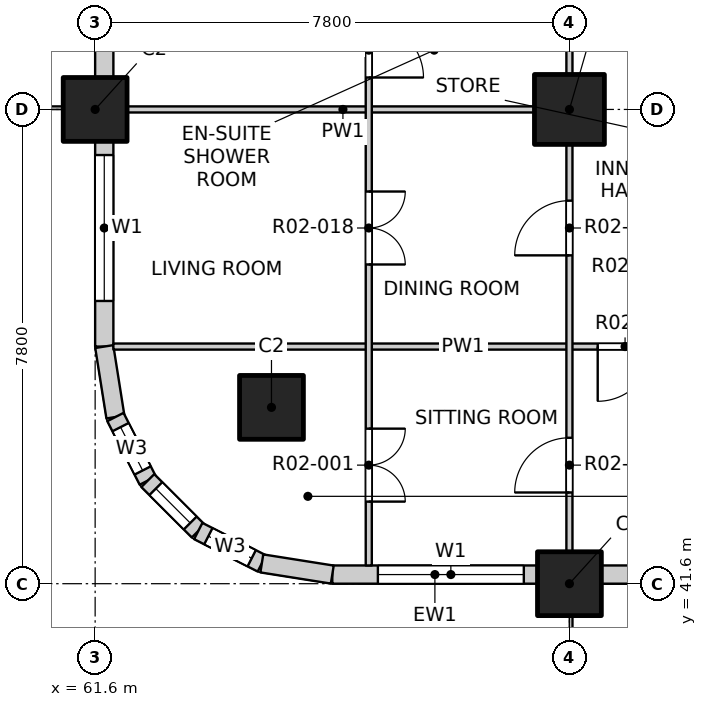
"""IFC4 building model, lengths in metres.
Left out: names, types, materials, properties, quantities, classifications, styles, units other than length and angle.
Written with IfcOpenShell. Run it as: python <this file> out.ifc"""

import sys

from ifc_helpers import new_model, si_unit, direction, frame, frame_2d, origin, origin_2d, place, context, subcontext, project, spatial, rectangle, extrude, element, fill, save


model = new_model("IFC4")
c1 = context("Model", 3, precision=1e-05, world=origin(), true_north=direction((0.0, 1.0)))
c2 = subcontext(c1, "Body", "Model", "MODEL_VIEW")
j1 = project(units=[si_unit("LENGTHUNIT", "METRE"), si_unit("PLANEANGLEUNIT", "RADIAN")], contexts=[c1])
p1 = place(None, origin())
s1 = spatial("IfcSite", under=j1, at=p1, CompositionType="ELEMENT")
p2 = place(p1, origin())
s2 = spatial("IfcBuilding", under=s1, at=p2, CompositionType="ELEMENT")
p3 = place(p2, frame((0.0, 0.0, 36.5)))
s3 = spatial("IfcBuildingStorey", under=s2, at=p3, CompositionType="ELEMENT", Elevation=36.5)
for number, where, z_axis, x_axis in (
    (1, (64.5, 44.5, -0.25), (0.0, 0.0, 1.0), (1.0, 0.0, 0.0)),
    (2, (61.6, 49.4, -0.25), (0.0, 0.0, 1.0), (1.0, 0.0, 0.0)),
    (3, (69.4, 41.6, -0.25), (0.0, 0.0, 1.0), (1.0, 0.0, 0.0)),
):
    element("IfcColumn", number, at=place(p3, frame(where, z_axis=z_axis, x_axis=x_axis)), inside=s3, PredefinedType="COLUMN", context=c2, shape_type="SweptSolid", body=[
        extrude(rectangle(XDim=1.05, YDim=1.05, at=origin_2d()), origin(), (0.0, 0.0, 1.0), 3.4),
    ])
p4 = place(p3, frame((69.4, 49.4, -0.25), z_axis=(0.0, 0.0, 1.0), x_axis=(1.0, 0.0, 0.0)))
e4 = element("IfcColumn", 4, at=p4, inside=s3, PredefinedType="COLUMN", context=c2, shape_type="SweptSolid", body=[
    extrude(rectangle(XDim=1.15, YDim=1.15, at=origin_2d()), origin(), (0.0, 0.0, 1.0), 3.4),
])
p5 = place(p3, frame((65.5, 41.75, 0.0), z_axis=(0.0, 0.0, 1.0), x_axis=(1.0, 0.0, 0.0)))
e5 = element("IfcWall", 5, at=p5, inside=s3, PredefinedType="SOLIDWALL", context=c2, shape_type="SweptSolid", body=[
    extrude(rectangle(XDim=3.375, YDim=0.3, at=frame_2d((1.688, 0.0))), origin(), (0.0, 0.0, 1.0), 2.7),
])
p6 = place(p5, frame((0.75, 0.0, 0.9)))
e6 = element("IfcOpeningElement", 6, at=p6, cuts=e5, PredefinedType="OPENING", context=c2, shape_type="SweptSolid", body=[
    extrude(rectangle(XDim=2.4, YDim=1.8, at=frame_2d((1.2, 0.9))), frame((0.0, 0.16, 0.0), z_axis=(0.0, -1.0, 0.0), x_axis=(1.0, 0.0, 0.0)), (0.0, 0.0, 1.0), 0.32),
])
p7 = place(p3, frame((69.925, 41.75, 0.0), z_axis=(0.0, 0.0, 1.0), x_axis=(1.0, 0.0, 0.0)))
e7 = element("IfcWall", 7, at=p7, inside=s3, PredefinedType="SOLIDWALL", context=c2, shape_type="SweptSolid", body=[
    extrude(rectangle(XDim=6.75, YDim=0.3, at=frame_2d((3.375, 0.0))), origin(), (0.0, 0.0, 1.0), 2.7),
])
p8 = place(p7, frame((0.525, 0.0, 0.0)))
e8 = element("IfcOpeningElement", 8, at=p8, cuts=e7, PredefinedType="OPENING", context=c2, shape_type="SweptSolid", body=[
    extrude(rectangle(XDim=1.8, YDim=2.4, at=frame_2d((0.9, 1.2))), frame((0.0, 0.16, 0.0), z_axis=(0.0, -1.0, 0.0), x_axis=(1.0, 0.0, 0.0)), (0.0, 0.0, 1.0), 0.32),
])
p9 = place(p7, frame((4.125, 0.0, 0.9)))
e9 = element("IfcOpeningElement", 9, at=p9, cuts=e7, PredefinedType="OPENING", context=c2, shape_type="SweptSolid", body=[
    extrude(rectangle(XDim=2.4, YDim=1.8, at=frame_2d((1.2, 0.9))), frame((0.0, 0.16, 0.0), z_axis=(0.0, -1.0, 0.0), x_axis=(1.0, 0.0, 0.0)), (0.0, 0.0, 1.0), 0.32),
])
p10 = place(p3, frame((61.75, 45.5, 0.0), z_axis=(0.0, 0.0, 1.0), x_axis=(0.0, 1.0, 0.0)))
e10 = element("IfcWall", 10, at=p10, inside=s3, PredefinedType="SOLIDWALL", context=c2, shape_type="SweptSolid", body=[
    extrude(rectangle(XDim=3.375, YDim=0.3, at=frame_2d((1.688, 0.0))), origin(), (0.0, 0.0, 1.0), 2.7),
])
p11 = place(p10, frame((0.75, 0.0, 0.9)))
e11 = element("IfcOpeningElement", 11, at=p11, cuts=e10, PredefinedType="OPENING", context=c2, shape_type="SweptSolid", body=[
    extrude(rectangle(XDim=2.4, YDim=1.8, at=frame_2d((1.2, 0.9))), frame((0.0, 0.16, 0.0), z_axis=(0.0, -1.0, 0.0), x_axis=(1.0, 0.0, 0.0)), (0.0, 0.0, 1.0), 0.32),
])
p12 = place(p3, frame((61.75, 49.925, 0.0), z_axis=(0.0, 0.0, 1.0), x_axis=(0.0, 1.0, 0.0)))
e12 = element("IfcWall", 12, at=p12, inside=s3, PredefinedType="SOLIDWALL", context=c2, shape_type="SweptSolid", body=[
    extrude(rectangle(XDim=6.75, YDim=0.3, at=frame_2d((3.375, 0.0))), origin(), (0.0, 0.0, 1.0), 2.7),
])
p13 = place(p12, frame((0.525, 0.0, 0.0)))
e13 = element("IfcOpeningElement", 13, at=p13, cuts=e12, PredefinedType="OPENING", context=c2, shape_type="SweptSolid", body=[
    extrude(rectangle(XDim=1.8, YDim=2.4, at=frame_2d((0.9, 1.2))), frame((0.0, 0.16, 0.0), z_axis=(0.0, -1.0, 0.0), x_axis=(1.0, 0.0, 0.0)), (0.0, 0.0, 1.0), 0.32),
])
p14 = place(p12, frame((4.125, 0.0, 0.9)))
e14 = element("IfcOpeningElement", 14, at=p14, cuts=e12, PredefinedType="OPENING", context=c2, shape_type="SweptSolid", body=[
    extrude(rectangle(XDim=2.4, YDim=1.8, at=frame_2d((1.2, 0.9))), frame((0.0, 0.16, 0.0), z_axis=(0.0, -1.0, 0.0), x_axis=(1.0, 0.0, 0.0)), (0.0, 0.0, 1.0), 0.32),
])
p15 = place(p3, frame((61.75, 45.5, 0.0), z_axis=(0.0, 0.0, 1.0), x_axis=(0.156496880861, -0.987678452879, 0.0)))
e15 = element("IfcWall", 15, at=p15, inside=s3, PredefinedType="SOLIDWALL", context=c2, shape_type="SweptSolid", body=[
    extrude(rectangle(XDim=1.173, YDim=0.3, at=frame_2d((0.586, 0.0))), origin(), (0.0, 0.0, 1.0), 2.7),
])
p16 = place(p3, frame((61.934, 44.341, 0.0), z_axis=(0.0, 0.0, 1.0), x_axis=(0.454025524128, -0.890988677504, 0.0)))
e16 = element("IfcWall", 16, at=p16, inside=s3, PredefinedType="SOLIDWALL", context=c2, shape_type="SweptSolid", body=[
    extrude(rectangle(XDim=1.173, YDim=0.3, at=frame_2d((0.587, 0.0))), origin(), (0.0, 0.0, 1.0), 2.7),
])
p17 = place(p16, frame((0.187, 0.0, 0.9)))
e17 = element("IfcOpeningElement", 17, at=p17, cuts=e16, PredefinedType="OPENING", context=c2, shape_type="SweptSolid", body=[
    extrude(rectangle(XDim=0.8, YDim=1.2, at=frame_2d((0.4, 0.6))), frame((0.0, 0.16, 0.0), z_axis=(0.0, -1.0, 0.0), x_axis=(1.0, 0.0, 0.0)), (0.0, 0.0, 1.0), 0.32),
])
p18 = place(p3, frame((62.466, 43.296, 0.0), z_axis=(0.0, 0.0, 1.0), x_axis=(0.707106781187, -0.707106781187, 0.0)))
e18 = element("IfcWall", 18, at=p18, inside=s3, PredefinedType="SOLIDWALL", context=c2, shape_type="SweptSolid", body=[
    extrude(rectangle(XDim=1.173, YDim=0.3, at=frame_2d((0.586, 0.0))), origin(), (0.0, 0.0, 1.0), 2.7),
])
p19 = place(p18, frame((0.187, 0.0, 0.9)))
e19 = element("IfcOpeningElement", 19, at=p19, cuts=e18, PredefinedType="OPENING", context=c2, shape_type="SweptSolid", body=[
    extrude(rectangle(XDim=0.8, YDim=1.2, at=frame_2d((0.4, 0.6))), frame((0.0, 0.16, 0.0), z_axis=(0.0, -1.0, 0.0), x_axis=(1.0, 0.0, 0.0)), (0.0, 0.0, 1.0), 0.32),
])
p20 = place(p3, frame((63.296, 42.466, 0.0), z_axis=(0.0, 0.0, 1.0), x_axis=(0.890988677504, -0.454025524128, 0.0)))
e20 = element("IfcWall", 20, at=p20, inside=s3, PredefinedType="SOLIDWALL", context=c2, shape_type="SweptSolid", body=[
    extrude(rectangle(XDim=1.173, YDim=0.3, at=frame_2d((0.587, 0.0))), origin(), (0.0, 0.0, 1.0), 2.7),
])
p21 = place(p20, frame((0.187, 0.0, 0.9)))
e21 = element("IfcOpeningElement", 21, at=p21, cuts=e20, PredefinedType="OPENING", context=c2, shape_type="SweptSolid", body=[
    extrude(rectangle(XDim=0.8, YDim=1.2, at=frame_2d((0.4, 0.6))), frame((0.0, 0.16, 0.0), z_axis=(0.0, -1.0, 0.0), x_axis=(1.0, 0.0, 0.0)), (0.0, 0.0, 1.0), 0.32),
])
p22 = place(p3, frame((64.341, 41.934, 0.0), z_axis=(0.0, 0.0, 1.0), x_axis=(0.987678452879, -0.156496880861, 0.0)))
e22 = element("IfcWall", 22, at=p22, inside=s3, PredefinedType="SOLIDWALL", context=c2, shape_type="SweptSolid", body=[
    extrude(rectangle(XDim=1.173, YDim=0.3, at=frame_2d((0.586, 0.0))), origin(), (0.0, 0.0, 1.0), 2.7),
])
p23 = place(p3, frame((61.9, 45.5, 0.0), z_axis=(0.0, 0.0, 1.0), x_axis=(1.0, 0.0, 0.0)))
e23 = element("IfcWall", 23, at=p23, inside=s3, PredefinedType="PARTITIONING", context=c2, shape_type="SweptSolid", body=[
    extrude(rectangle(XDim=11.5, YDim=0.1, at=frame_2d((5.75, 0.0))), origin(), (0.0, 0.0, 1.0), 3.15),
])
p24 = place(p23, frame((7.965, 0.0, 0.0)))
e24 = element("IfcOpeningElement", 24, at=p24, cuts=e23, PredefinedType="OPENING", context=c2, shape_type="SweptSolid", body=[
    extrude(rectangle(XDim=0.9, YDim=2.1, at=frame_2d((0.45, 1.05))), frame((0.0, 0.06, 0.0), z_axis=(0.0, -1.0, 0.0), x_axis=(1.0, 0.0, 0.0)), (0.0, 0.0, 1.0), 0.12),
])
p25 = place(p3, frame((61.9, 49.4, 0.0), z_axis=(0.0, 0.0, 1.0), x_axis=(1.0, 0.0, 0.0)))
e25 = element("IfcWall", 25, at=p25, inside=s3, PredefinedType="PARTITIONING", context=c2, shape_type="SweptSolid", body=[
    extrude(rectangle(XDim=7.55, YDim=0.1, at=frame_2d((3.775, 0.0))), origin(), (0.0, 0.0, 1.0), 3.15),
])
p26 = place(p3, frame((66.1, 41.9, 0.0), z_axis=(0.0, 0.0, 1.0), x_axis=(0.0, 1.0, 0.0)))
e26 = element("IfcWall", 26, at=p26, inside=s3, PredefinedType="PARTITIONING", context=c2, shape_type="SweptSolid", body=[
    extrude(rectangle(XDim=34.7, YDim=0.1, at=frame_2d((17.35, 0.0))), origin(), (0.0, 0.0, 1.0), 3.15),
])
p27 = place(p26, frame((1.05, 0.0, 0.0)))
e27 = element("IfcOpeningElement", 27, at=p27, cuts=e26, PredefinedType="OPENING", context=c2, shape_type="SweptSolid", body=[
    extrude(rectangle(XDim=1.2, YDim=2.1, at=frame_2d((0.6, 1.05))), frame((0.0, 0.06, 0.0), z_axis=(0.0, -1.0, 0.0), x_axis=(1.0, 0.0, 0.0)), (0.0, 0.0, 1.0), 0.12),
])
p28 = place(p26, frame((4.95, 0.0, 0.0)))
e28 = element("IfcOpeningElement", 28, at=p28, cuts=e26, PredefinedType="OPENING", context=c2, shape_type="SweptSolid", body=[
    extrude(rectangle(XDim=1.2, YDim=2.1, at=frame_2d((0.6, 1.05))), frame((0.0, 0.06, 0.0), z_axis=(0.0, -1.0, 0.0), x_axis=(1.0, 0.0, 0.0)), (0.0, 0.0, 1.0), 0.12),
])
p29 = place(p26, frame((8.025, 0.0, 0.0)))
e29 = element("IfcOpeningElement", 29, at=p29, cuts=e26, PredefinedType="OPENING", context=c2, shape_type="SweptSolid", body=[
    extrude(rectangle(XDim=0.9, YDim=2.1, at=frame_2d((0.45, 1.05))), frame((0.0, 0.06, 0.0), z_axis=(0.0, -1.0, 0.0), x_axis=(1.0, 0.0, 0.0)), (0.0, 0.0, 1.0), 0.12),
])
p30 = place(p26, frame((9.975, 0.0, 0.0)))
e30 = element("IfcOpeningElement", 30, at=p30, cuts=e26, PredefinedType="OPENING", context=c2, shape_type="SweptSolid", body=[
    extrude(rectangle(XDim=0.9, YDim=2.1, at=frame_2d((0.45, 1.05))), frame((0.0, 0.06, 0.0), z_axis=(0.0, -1.0, 0.0), x_axis=(1.0, 0.0, 0.0)), (0.0, 0.0, 1.0), 0.12),
])
p31 = place(p26, frame((12.75, 0.0, 0.0)))
e31 = element("IfcOpeningElement", 31, at=p31, cuts=e26, PredefinedType="OPENING", context=c2, shape_type="SweptSolid", body=[
    extrude(rectangle(XDim=1.2, YDim=2.1, at=frame_2d((0.6, 1.05))), frame((0.0, 0.06, 0.0), z_axis=(0.0, -1.0, 0.0), x_axis=(1.0, 0.0, 0.0)), (0.0, 0.0, 1.0), 0.12),
])
p32 = place(p26, frame((15.825, 0.0, 0.0)))
e32 = element("IfcOpeningElement", 32, at=p32, cuts=e26, PredefinedType="OPENING", context=c2, shape_type="SweptSolid", body=[
    extrude(rectangle(XDim=0.9, YDim=2.1, at=frame_2d((0.45, 1.05))), frame((0.0, 0.06, 0.0), z_axis=(0.0, -1.0, 0.0), x_axis=(1.0, 0.0, 0.0)), (0.0, 0.0, 1.0), 0.12),
])
p33 = place(p26, frame((17.775, 0.0, 0.0)))
e33 = element("IfcOpeningElement", 33, at=p33, cuts=e26, PredefinedType="OPENING", context=c2, shape_type="SweptSolid", body=[
    extrude(rectangle(XDim=0.9, YDim=2.1, at=frame_2d((0.45, 1.05))), frame((0.0, 0.06, 0.0), z_axis=(0.0, -1.0, 0.0), x_axis=(1.0, 0.0, 0.0)), (0.0, 0.0, 1.0), 0.12),
])
p34 = place(p26, frame((19.725, 0.0, 0.0)))
e34 = element("IfcOpeningElement", 34, at=p34, cuts=e26, PredefinedType="OPENING", context=c2, shape_type="SweptSolid", body=[
    extrude(rectangle(XDim=0.9, YDim=2.1, at=frame_2d((0.45, 1.05))), frame((0.0, 0.06, 0.0), z_axis=(0.0, -1.0, 0.0), x_axis=(1.0, 0.0, 0.0)), (0.0, 0.0, 1.0), 0.12),
])
p35 = place(p26, frame((21.675, 0.0, 0.0)))
e35 = element("IfcOpeningElement", 35, at=p35, cuts=e26, PredefinedType="OPENING", context=c2, shape_type="SweptSolid", body=[
    extrude(rectangle(XDim=0.9, YDim=2.1, at=frame_2d((0.45, 1.05))), frame((0.0, 0.06, 0.0), z_axis=(0.0, -1.0, 0.0), x_axis=(1.0, 0.0, 0.0)), (0.0, 0.0, 1.0), 0.12),
])
p36 = place(p26, frame((24.45, 0.0, 0.0)))
e36 = element("IfcOpeningElement", 36, at=p36, cuts=e26, PredefinedType="OPENING", context=c2, shape_type="SweptSolid", body=[
    extrude(rectangle(XDim=1.2, YDim=2.1, at=frame_2d((0.6, 1.05))), frame((0.0, 0.06, 0.0), z_axis=(0.0, -1.0, 0.0), x_axis=(1.0, 0.0, 0.0)), (0.0, 0.0, 1.0), 0.12),
])
p37 = place(p26, frame((27.525, 0.0, 0.0)))
e37 = element("IfcOpeningElement", 37, at=p37, cuts=e26, PredefinedType="OPENING", context=c2, shape_type="SweptSolid", body=[
    extrude(rectangle(XDim=0.9, YDim=2.1, at=frame_2d((0.45, 1.05))), frame((0.0, 0.06, 0.0), z_axis=(0.0, -1.0, 0.0), x_axis=(1.0, 0.0, 0.0)), (0.0, 0.0, 1.0), 0.12),
])
p38 = place(p26, frame((29.475, 0.0, 0.0)))
e38 = element("IfcOpeningElement", 38, at=p38, cuts=e26, PredefinedType="OPENING", context=c2, shape_type="SweptSolid", body=[
    extrude(rectangle(XDim=0.9, YDim=2.1, at=frame_2d((0.45, 1.05))), frame((0.0, 0.06, 0.0), z_axis=(0.0, -1.0, 0.0), x_axis=(1.0, 0.0, 0.0)), (0.0, 0.0, 1.0), 0.12),
])
p39 = place(p26, frame((31.425, 0.0, 0.0)))
e39 = element("IfcOpeningElement", 39, at=p39, cuts=e26, PredefinedType="OPENING", context=c2, shape_type="SweptSolid", body=[
    extrude(rectangle(XDim=0.9, YDim=2.1, at=frame_2d((0.45, 1.05))), frame((0.0, 0.06, 0.0), z_axis=(0.0, -1.0, 0.0), x_axis=(1.0, 0.0, 0.0)), (0.0, 0.0, 1.0), 0.12),
])
p40 = place(p26, frame((33.375, 0.0, 0.0)))
e40 = element("IfcOpeningElement", 40, at=p40, cuts=e26, PredefinedType="OPENING", context=c2, shape_type="SweptSolid", body=[
    extrude(rectangle(XDim=0.9, YDim=2.1, at=frame_2d((0.45, 1.05))), frame((0.0, 0.06, 0.0), z_axis=(0.0, -1.0, 0.0), x_axis=(1.0, 0.0, 0.0)), (0.0, 0.0, 1.0), 0.12),
])
p41 = place(p3, frame((69.4, 41.9, 0.0), z_axis=(0.0, 0.0, 1.0), x_axis=(0.0, 1.0, 0.0)))
e41 = element("IfcWall", 41, at=p41, inside=s3, PredefinedType="PARTITIONING", context=c2, shape_type="SweptSolid", body=[
    extrude(rectangle(XDim=46.2, YDim=0.1, at=frame_2d((23.1, 0.0))), origin(), (0.0, 0.0, 1.0), 3.15),
])
p42 = place(p41, frame((1.2, 0.0, 0.0)))
e42 = element("IfcOpeningElement", 42, at=p42, cuts=e41, PredefinedType="OPENING", context=c2, shape_type="SweptSolid", body=[
    extrude(rectangle(XDim=0.9, YDim=2.1, at=frame_2d((0.45, 1.05))), frame((0.0, 0.06, 0.0), z_axis=(0.0, -1.0, 0.0), x_axis=(1.0, 0.0, 0.0)), (0.0, 0.0, 1.0), 0.12),
])
p43 = place(p41, frame((5.1, 0.0, 0.0)))
e43 = element("IfcOpeningElement", 43, at=p43, cuts=e41, PredefinedType="OPENING", context=c2, shape_type="SweptSolid", body=[
    extrude(rectangle(XDim=0.9, YDim=2.1, at=frame_2d((0.45, 1.05))), frame((0.0, 0.06, 0.0), z_axis=(0.0, -1.0, 0.0), x_axis=(1.0, 0.0, 0.0)), (0.0, 0.0, 1.0), 0.12),
])
p44 = place(p41, frame((9.975, 0.0, 0.0)))
e44 = element("IfcOpeningElement", 44, at=p44, cuts=e41, PredefinedType="OPENING", context=c2, shape_type="SweptSolid", body=[
    extrude(rectangle(XDim=0.9, YDim=2.1, at=frame_2d((0.45, 1.05))), frame((0.0, 0.06, 0.0), z_axis=(0.0, -1.0, 0.0), x_axis=(1.0, 0.0, 0.0)), (0.0, 0.0, 1.0), 0.12),
])
p45 = place(p41, frame((12.9, 0.0, 0.0)))
e45 = element("IfcOpeningElement", 45, at=p45, cuts=e41, PredefinedType="OPENING", context=c2, shape_type="SweptSolid", body=[
    extrude(rectangle(XDim=0.9, YDim=2.1, at=frame_2d((0.45, 1.05))), frame((0.0, 0.06, 0.0), z_axis=(0.0, -1.0, 0.0), x_axis=(1.0, 0.0, 0.0)), (0.0, 0.0, 1.0), 0.12),
])
p46 = place(p41, frame((17.775, 0.0, 0.0)))
e46 = element("IfcOpeningElement", 46, at=p46, cuts=e41, PredefinedType="OPENING", context=c2, shape_type="SweptSolid", body=[
    extrude(rectangle(XDim=0.9, YDim=2.1, at=frame_2d((0.45, 1.05))), frame((0.0, 0.06, 0.0), z_axis=(0.0, -1.0, 0.0), x_axis=(1.0, 0.0, 0.0)), (0.0, 0.0, 1.0), 0.12),
])
p47 = place(p41, frame((21.5, 0.0, 0.0)))
e47 = element("IfcOpeningElement", 47, at=p47, cuts=e41, PredefinedType="OPENING", context=c2, shape_type="SweptSolid", body=[
    extrude(rectangle(XDim=0.9, YDim=2.1, at=frame_2d((0.45, 1.05))), frame((0.0, 0.06, 0.0), z_axis=(0.0, -1.0, 0.0), x_axis=(1.0, 0.0, 0.0)), (0.0, 0.0, 1.0), 0.12),
])
p48 = place(p41, frame((24.6, 0.0, 0.0)))
e48 = element("IfcOpeningElement", 48, at=p48, cuts=e41, PredefinedType="OPENING", context=c2, shape_type="SweptSolid", body=[
    extrude(rectangle(XDim=0.9, YDim=2.1, at=frame_2d((0.45, 1.05))), frame((0.0, 0.06, 0.0), z_axis=(0.0, -1.0, 0.0), x_axis=(1.0, 0.0, 0.0)), (0.0, 0.0, 1.0), 0.12),
])
p49 = place(p41, frame((29.3, 0.0, 0.0)))
e49 = element("IfcOpeningElement", 49, at=p49, cuts=e41, PredefinedType="OPENING", context=c2, shape_type="SweptSolid", body=[
    extrude(rectangle(XDim=0.9, YDim=2.1, at=frame_2d((0.45, 1.05))), frame((0.0, 0.06, 0.0), z_axis=(0.0, -1.0, 0.0), x_axis=(1.0, 0.0, 0.0)), (0.0, 0.0, 1.0), 0.12),
])
p50 = place(p41, frame((33.375, 0.0, 0.0)))
e50 = element("IfcOpeningElement", 50, at=p50, cuts=e41, PredefinedType="OPENING", context=c2, shape_type="SweptSolid", body=[
    extrude(rectangle(XDim=0.9, YDim=2.1, at=frame_2d((0.45, 1.05))), frame((0.0, 0.06, 0.0), z_axis=(0.0, -1.0, 0.0), x_axis=(1.0, 0.0, 0.0)), (0.0, 0.0, 1.0), 0.12),
])
p51 = place(p41, frame((37.1, 0.0, 0.0)))
e51 = element("IfcOpeningElement", 51, at=p51, cuts=e41, PredefinedType="OPENING", context=c2, shape_type="SweptSolid", body=[
    extrude(rectangle(XDim=0.9, YDim=2.1, at=frame_2d((0.45, 1.05))), frame((0.0, 0.06, 0.0), z_axis=(0.0, -1.0, 0.0), x_axis=(1.0, 0.0, 0.0)), (0.0, 0.0, 1.0), 0.12),
])
p52 = place(p41, frame((41.175, 0.0, 0.0)))
e52 = element("IfcOpeningElement", 52, at=p52, cuts=e41, PredefinedType="OPENING", context=c2, shape_type="SweptSolid", body=[
    extrude(rectangle(XDim=0.9, YDim=2.1, at=frame_2d((0.45, 1.05))), frame((0.0, 0.06, 0.0), z_axis=(0.0, -1.0, 0.0), x_axis=(1.0, 0.0, 0.0)), (0.0, 0.0, 1.0), 0.12),
])
p53 = place(p41, frame((44.1, 0.0, 0.0)))
e53 = element("IfcOpeningElement", 53, at=p53, cuts=e41, PredefinedType="OPENING", context=c2, shape_type="SweptSolid", body=[
    extrude(rectangle(XDim=0.9, YDim=2.1, at=frame_2d((0.45, 1.05))), frame((0.0, 0.06, 0.0), z_axis=(0.0, -1.0, 0.0), x_axis=(1.0, 0.0, 0.0)), (0.0, 0.0, 1.0), 0.12),
])
p54 = place(p6, origin())
e54 = element("IfcWindow", 54, at=p54, inside=s3, PartitioningType="DOUBLE_PANEL_VERTICAL", PredefinedType="WINDOW", context=c2, shape_type="SweptSolid", body=[
    extrude(rectangle(XDim=2.4, YDim=1.8, at=frame_2d((1.2, 0.9))), frame((0.0, 0.03, 0.0), z_axis=(0.0, -1.0, 0.0), x_axis=(1.0, 0.0, 0.0)), (0.0, 0.0, 1.0), 0.06),
])
fill(e6, e54)
p55 = place(p11, origin())
e55 = element("IfcWindow", 55, at=p55, inside=s3, PartitioningType="DOUBLE_PANEL_VERTICAL", PredefinedType="WINDOW", context=c2, shape_type="SweptSolid", body=[
    extrude(rectangle(XDim=2.4, YDim=1.8, at=frame_2d((1.2, 0.9))), frame((0.0, 0.03, 0.0), z_axis=(0.0, -1.0, 0.0), x_axis=(1.0, 0.0, 0.0)), (0.0, 0.0, 1.0), 0.06),
])
fill(e11, e55)
p56 = place(p17, origin())
e56 = element("IfcWindow", 56, at=p56, inside=s3, PartitioningType="SINGLE_PANEL", PredefinedType="WINDOW", context=c2, shape_type="SweptSolid", body=[
    extrude(rectangle(XDim=0.8, YDim=1.2, at=frame_2d((0.4, 0.6))), frame((0.0, 0.03, 0.0), z_axis=(0.0, -1.0, 0.0), x_axis=(1.0, 0.0, 0.0)), (0.0, 0.0, 1.0), 0.06),
])
fill(e17, e56)
p57 = place(p19, origin())
e57 = element("IfcWindow", 57, at=p57, inside=s3, PartitioningType="SINGLE_PANEL", PredefinedType="WINDOW", context=c2, shape_type="SweptSolid", body=[
    extrude(rectangle(XDim=0.8, YDim=1.2, at=frame_2d((0.4, 0.6))), frame((0.0, 0.03, 0.0), z_axis=(0.0, -1.0, 0.0), x_axis=(1.0, 0.0, 0.0)), (0.0, 0.0, 1.0), 0.06),
])
fill(e19, e57)
p58 = place(p21, origin())
e58 = element("IfcWindow", 58, at=p58, inside=s3, PartitioningType="SINGLE_PANEL", PredefinedType="WINDOW", context=c2, shape_type="SweptSolid", body=[
    extrude(rectangle(XDim=0.8, YDim=1.2, at=frame_2d((0.4, 0.6))), frame((0.0, 0.03, 0.0), z_axis=(0.0, -1.0, 0.0), x_axis=(1.0, 0.0, 0.0)), (0.0, 0.0, 1.0), 0.06),
])
fill(e21, e58)
p59 = place(p27, origin())
e59 = element("IfcDoor", 59, at=p59, inside=s3, OperationType="DOUBLE_DOOR_SINGLE_SWING", PredefinedType="DOOR", context=c2, shape_type="SweptSolid", body=[
    extrude(rectangle(XDim=1.2, YDim=2.1, at=frame_2d((0.6, 1.05))), frame((0.0, 0.025, 0.0), z_axis=(0.0, -1.0, 0.0), x_axis=(1.0, 0.0, 0.0)), (0.0, 0.0, 1.0), 0.05),
])
fill(e27, e59)
p60 = place(p42, origin())
e60 = element("IfcDoor", 60, at=p60, inside=s3, OperationType="SINGLE_SWING_LEFT", PredefinedType="DOOR", context=c2, shape_type="SweptSolid", body=[
    extrude(rectangle(XDim=0.9, YDim=2.1, at=frame_2d((0.45, 1.05))), frame((0.0, 0.025, 0.0), z_axis=(0.0, -1.0, 0.0), x_axis=(1.0, 0.0, 0.0)), (0.0, 0.0, 1.0), 0.05),
])
fill(e42, e60)
p61 = place(p24, origin())
e61 = element("IfcDoor", 61, at=p61, inside=s3, OperationType="SINGLE_SWING_RIGHT", PredefinedType="DOOR", context=c2, shape_type="SweptSolid", body=[
    extrude(rectangle(XDim=0.9, YDim=2.1, at=frame_2d((0.45, 1.05))), frame((0.0, 0.025, 0.0), z_axis=(0.0, -1.0, 0.0), x_axis=(1.0, 0.0, 0.0)), (0.0, 0.0, 1.0), 0.05),
])
fill(e24, e61)
p62 = place(p28, origin())
e62 = element("IfcDoor", 62, at=p62, inside=s3, OperationType="DOUBLE_DOOR_SINGLE_SWING", PredefinedType="DOOR", context=c2, shape_type="SweptSolid", body=[
    extrude(rectangle(XDim=1.2, YDim=2.1, at=frame_2d((0.6, 1.05))), frame((0.0, 0.025, 0.0), z_axis=(0.0, -1.0, 0.0), x_axis=(1.0, 0.0, 0.0)), (0.0, 0.0, 1.0), 0.05),
])
fill(e28, e62)
p63 = place(p43, origin())
e63 = element("IfcDoor", 63, at=p63, inside=s3, OperationType="SINGLE_SWING_LEFT", PredefinedType="DOOR", context=c2, shape_type="SweptSolid", body=[
    extrude(rectangle(XDim=0.9, YDim=2.1, at=frame_2d((0.45, 1.05))), frame((0.0, 0.025, 0.0), z_axis=(0.0, -1.0, 0.0), x_axis=(1.0, 0.0, 0.0)), (0.0, 0.0, 1.0), 0.05),
])
fill(e43, e63)
p64 = place(p29, origin())
e64 = element("IfcDoor", 64, at=p64, inside=s3, OperationType="SINGLE_SWING_RIGHT", PredefinedType="DOOR", context=c2, shape_type="SweptSolid", body=[
    extrude(rectangle(XDim=0.9, YDim=2.1, at=frame_2d((0.45, 1.05))), frame((0.0, 0.025, 0.0), z_axis=(0.0, -1.0, 0.0), x_axis=(1.0, 0.0, 0.0)), (0.0, 0.0, 1.0), 0.05),
])
fill(e29, e64)
save(model, sys.argv[1])
